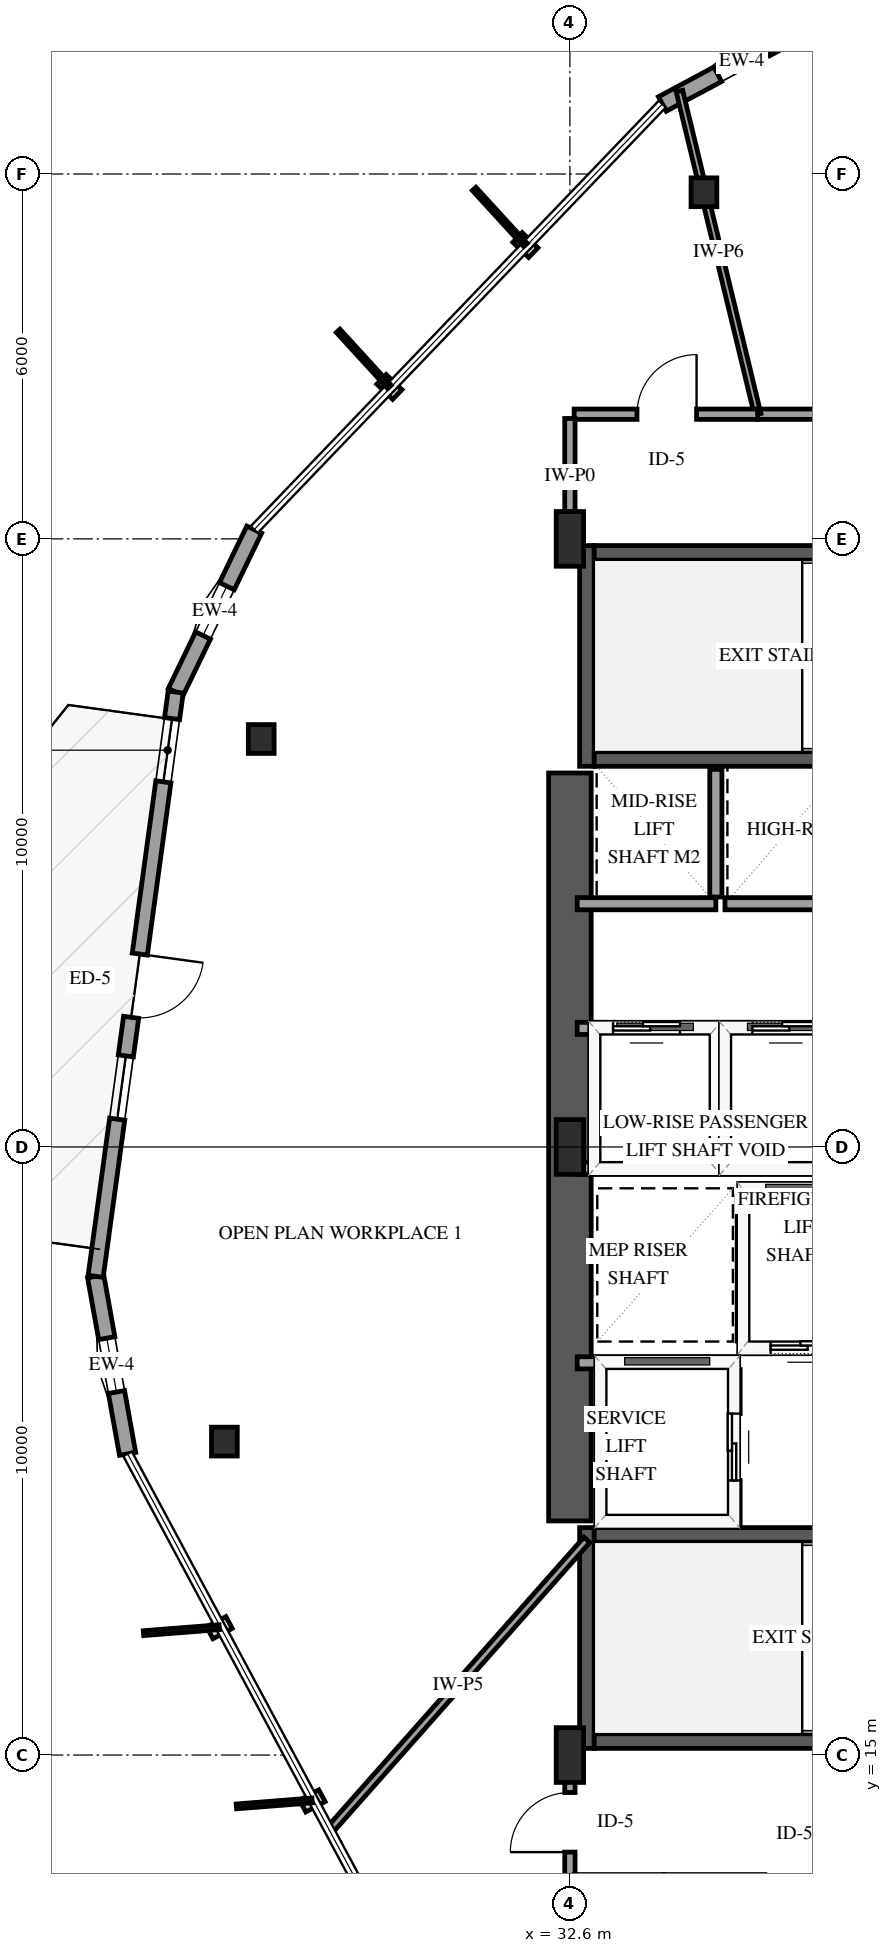
"""IFC4 building model, lengths in metres.
Left out: names, types, materials, properties, quantities, classifications, styles, units other than length and angle.
Written with IfcOpenShell. Run it as: python <this file> out.ifc"""

import sys

from ifc_helpers import new_model, si_unit, direction, frame, frame_2d, origin, origin_2d, place, context, subcontext, project, spatial, rectangle, i_section, extrude, element, fill, save


model = new_model("IFC4")
c1 = context("Model", 3, precision=1e-05, world=origin(), true_north=direction((0.0, 1.0)))
c2 = subcontext(c1, "Body", "Model", "MODEL_VIEW")
j1 = project(units=[si_unit("LENGTHUNIT", "METRE"), si_unit("PLANEANGLEUNIT", "RADIAN")], contexts=[c1])
p1 = place(None, origin())
s1 = spatial("IfcSite", under=j1, at=p1, CompositionType="ELEMENT")
p2 = place(p1, origin())
s2 = spatial("IfcBuilding", under=s1, at=p2, CompositionType="ELEMENT")
p3 = place(p2, frame((0.0, 0.0, 66.6)))
s3 = spatial("IfcBuildingStorey", under=s2, at=p3, CompositionType="ELEMENT", Elevation=66.6)
p4 = place(p3, frame((32.88, 15.11, 0.0), z_axis=(0.0, 0.0, 1.0), x_axis=(0.0, 1.0, 0.0)))
e1 = element("IfcWall", 1, at=p4, inside=s3, PredefinedType="SHEAR", context=c2, shape_type="SweptSolid", body=[
    extrude(rectangle(XDim=3.63, YDim=0.24, at=frame_2d((1.815, 0.0))), origin(), (0.0, 0.0, 1.0), 4.0),
])
for number, where, z_axis, x_axis in (
    (2, (33.0, 15.23, 0.0), (0.0, 0.0, 1.0), (1.0, 0.0, 0.0)),
    (3, (33.0, 18.62, 0.0), (0.0, 0.0, 1.0), (1.0, 0.0, 0.0)),
):
    element("IfcWall", number, at=place(p3, frame(where, z_axis=z_axis, x_axis=x_axis)), inside=s3, PredefinedType="SHEAR", context=c2, shape_type="SweptSolid", body=[
        extrude(rectangle(XDim=8.0, YDim=0.24, at=frame_2d((4.0, 0.0))), origin(), (0.0, 0.0, 1.0), 4.0),
    ])
p5 = place(p3, frame((32.88, 31.26, 0.0), z_axis=(0.0, 0.0, 1.0), x_axis=(0.0, 1.0, 0.0)))
e4 = element("IfcWall", 4, at=p5, inside=s3, PredefinedType="SHEAR", context=c2, shape_type="SweptSolid", body=[
    extrude(rectangle(XDim=3.63, YDim=0.24, at=frame_2d((1.815, 0.0))), origin(), (0.0, 0.0, 1.0), 4.0),
])
for number, where, z_axis, x_axis in (
    (5, (33.0, 31.38, 0.0), (0.0, 0.0, 1.0), (1.0, 0.0, 0.0)),
    (6, (33.0, 34.77, 0.0), (0.0, 0.0, 1.0), (1.0, 0.0, 0.0)),
):
    element("IfcWall", number, at=place(p3, frame(where, z_axis=z_axis, x_axis=x_axis)), inside=s3, PredefinedType="SHEAR", context=c2, shape_type="SweptSolid", body=[
        extrude(rectangle(XDim=8.0, YDim=0.24, at=frame_2d((4.0, 0.0))), origin(), (0.0, 0.0, 1.0), 4.0),
    ])
p6 = place(p3, frame((32.6, 18.85, 0.0), z_axis=(0.0, 0.0, 1.0), x_axis=(0.0, 1.0, 0.0)))
e7 = element("IfcWall", 7, at=p6, inside=s3, PredefinedType="SHEAR", context=c2, shape_type="SweptSolid", body=[
    extrude(rectangle(XDim=12.3, YDim=0.7, at=frame_2d((6.15, 0.0))), origin(), (0.0, 0.0, 1.0), 4.0),
])
for number, where, z_axis, x_axis in (
    (8, (32.6, 15.0, 0.0), (0.0, 0.0, 1.0), (1.0, 0.0, 0.0)),
    (9, (32.6, 25.0, 0.0), (0.0, 0.0, 1.0), (1.0, 0.0, 0.0)),
    (10, (32.6, 35.0, 0.0), (0.0, 0.0, 1.0), (1.0, 0.0, 0.0)),
):
    element("IfcColumn", number, at=place(p3, frame(where, z_axis=z_axis, x_axis=x_axis)), inside=s3, PredefinedType="PILASTER", context=c2, shape_type="SweptSolid", body=[
        extrude(rectangle(XDim=0.45, YDim=0.9, at=origin_2d()), origin(), (0.0, 0.0, 1.0), 4.0),
    ])
for number, where, z_axis, x_axis in (
    (11, (34.804, 40.7, 0.0), (0.0, 0.0, 1.0), (1.0, 0.0, 0.0)),
    (12, (27.523, 31.708, 0.0), (0.0, 0.0, 1.0), (1.0, 0.0, 0.0)),
    (13, (26.918, 20.155, 0.0), (0.0, 0.0, 1.0), (1.0, 0.0, 0.0)),
):
    element("IfcColumn", number, at=place(p3, frame(where, z_axis=z_axis, x_axis=x_axis)), inside=s3, PredefinedType="COLUMN", context=c2, shape_type="SweptSolid", body=[
        extrude(i_section(OverallWidth=0.424, OverallDepth=0.474, WebThickness=0.048, FlangeThickness=0.077, FilletRadius=0.038, at=origin_2d()), origin(), (0.0, 0.0, 1.0), 4.0),
    ])
p7 = place(p3, frame((36.735, 43.553, 0.0), z_axis=(0.0, 0.0, 1.0), x_axis=(-0.881307407795, -0.47254338739, 0.0)))
e14 = element("IfcWall", 14, at=p7, inside=s3, PredefinedType="SOLIDWALL", context=c2, shape_type="SweptSolid", body=[
    extrude(rectangle(XDim=2.967, YDim=0.27, at=frame_2d((1.483, 0.0))), origin(), (0.0, 0.0, 1.0), 3.079),
])
p8 = place(p7, frame((1.033, 0.0, 0.75)))
e15 = element("IfcOpeningElement", 15, at=p8, cuts=e14, PredefinedType="OPENING", context=c2, shape_type="SweptSolid", body=[
    extrude(rectangle(XDim=0.9, YDim=1.5, at=frame_2d((0.45, 0.75))), frame((0.0, 0.145, 0.0), z_axis=(0.0, -1.0, 0.0), x_axis=(1.0, 0.0, 0.0)), (0.0, 0.0, 1.0), 0.29),
])
p9 = place(p3, frame((27.408, 35.152, 0.0), z_axis=(0.0, 0.0, 1.0), x_axis=(-0.435190898054, -0.900338204371, 0.0)))
e16 = element("IfcWall", 16, at=p9, inside=s3, PredefinedType="SOLIDWALL", context=c2, shape_type="SweptSolid", body=[
    extrude(rectangle(XDim=2.967, YDim=0.27, at=frame_2d((1.483, 0.0))), origin(), (0.0, 0.0, 1.0), 3.079),
])
p10 = place(p9, frame((1.033, 0.0, 0.75)))
e17 = element("IfcOpeningElement", 17, at=p10, cuts=e16, PredefinedType="OPENING", context=c2, shape_type="SweptSolid", body=[
    extrude(rectangle(XDim=0.9, YDim=1.5, at=frame_2d((0.45, 0.75))), frame((0.0, 0.145, 0.0), z_axis=(0.0, -1.0, 0.0), x_axis=(1.0, 0.0, 0.0)), (0.0, 0.0, 1.0), 0.29),
])
p11 = place(p3, frame((24.801, 22.873, 0.0), z_axis=(0.0, 0.0, 1.0), x_axis=(0.177089231547, -0.984194799859, 0.0)))
e18 = element("IfcWall", 18, at=p11, inside=s3, PredefinedType="SOLIDWALL", context=c2, shape_type="SweptSolid", body=[
    extrude(rectangle(XDim=2.967, YDim=0.27, at=frame_2d((1.483, 0.0))), origin(), (0.0, 0.0, 1.0), 3.079),
])
p12 = place(p11, frame((1.033, 0.0, 0.75)))
e19 = element("IfcOpeningElement", 19, at=p12, cuts=e18, PredefinedType="OPENING", context=c2, shape_type="SweptSolid", body=[
    extrude(rectangle(XDim=0.9, YDim=1.5, at=frame_2d((0.45, 0.75))), frame((0.0, 0.145, 0.0), z_axis=(0.0, -1.0, 0.0), x_axis=(1.0, 0.0, 0.0)), (0.0, 0.0, 1.0), 0.29),
])
p13 = place(p3, frame((26.117, 32.481, 0.0), z_axis=(0.0, 0.0, 1.0), x_axis=(-0.13571645175, -0.99074772002, 0.0)))
e20 = element("IfcWall", 20, at=p13, inside=s3, PredefinedType="SOLIDWALL", context=c2, shape_type="SweptSolid", body=[
    extrude(rectangle(XDim=9.698, YDim=0.25, at=frame_2d((4.849, 0.0))), origin(), (0.0, 0.0, 1.0), 3.079),
])
p14 = place(p13, frame((4.349, 0.0, 0.0)))
e21 = element("IfcOpeningElement", 21, at=p14, cuts=e20, PredefinedType="OPENING", context=c2, shape_type="SweptSolid", body=[
    extrude(rectangle(XDim=1.05, YDim=2.15, at=frame_2d((0.525, 1.075))), frame((0.0, 0.135, 0.0), z_axis=(0.0, -1.0, 0.0), x_axis=(1.0, 0.0, 0.0)), (0.0, 0.0, 1.0), 0.27),
])
p15 = place(p13, frame((0.44, 0.0, 0.72)))
e22 = element("IfcOpeningElement", 22, at=p15, cuts=e20, PredefinedType="OPENING", context=c2, shape_type="SweptSolid", body=[
    extrude(rectangle(XDim=1.05, YDim=1.55, at=frame_2d((0.525, 0.775))), frame((0.0, 0.135, 0.0), z_axis=(0.0, -1.0, 0.0), x_axis=(1.0, 0.0, 0.0)), (0.0, 0.0, 1.0), 0.27),
])
p16 = place(p13, frame((6.039, 0.0, 0.72)))
e23 = element("IfcOpeningElement", 23, at=p16, cuts=e20, PredefinedType="OPENING", context=c2, shape_type="SweptSolid", body=[
    extrude(rectangle(XDim=1.05, YDim=1.55, at=frame_2d((0.525, 0.775))), frame((0.0, 0.135, 0.0), z_axis=(0.0, -1.0, 0.0), x_axis=(1.0, 0.0, 0.0)), (0.0, 0.0, 1.0), 0.27),
])
p17 = place(p3, frame((35.45, 21.7, 0.0), z_axis=(0.0, 0.0, 1.0), x_axis=(1.0, 0.0, 0.0)))
e24 = element("IfcWall", 24, at=p17, inside=s3, PredefinedType="SOLIDWALL", context=c2, shape_type="SweptSolid", body=[
    extrude(rectangle(XDim=2.0, YDim=0.2, at=frame_2d((1.0, 0.0))), origin(), (0.0, 0.0, 1.0), 3.7),
])
p18 = place(p17, frame((0.45, 0.0, 0.0)))
e25 = element("IfcOpeningElement", 25, at=p18, cuts=e24, PredefinedType="OPENING", context=c2, shape_type="SweptSolid", body=[
    extrude(rectangle(XDim=1.1, YDim=2.15, at=frame_2d((0.55, 1.075))), frame((0.0, 0.11, 0.0), z_axis=(0.0, -1.0, 0.0), x_axis=(1.0, 0.0, 0.0)), (0.0, 0.0, 1.0), 0.22),
])
p19 = place(p3, frame((35.45, 24.3, 0.0), z_axis=(0.0, 0.0, 1.0), x_axis=(1.0, 0.0, 0.0)))
e26 = element("IfcWall", 26, at=p19, inside=s3, PredefinedType="SOLIDWALL", context=c2, shape_type="SweptSolid", body=[
    extrude(rectangle(XDim=2.0, YDim=0.2, at=frame_2d((1.0, 0.0))), origin(), (0.0, 0.0, 1.0), 3.7),
])
p20 = place(p3, frame((35.45, 21.81, 0.0), z_axis=(0.0, 0.0, 1.0), x_axis=(0.0, 1.0, 0.0)))
e27 = element("IfcWall", 27, at=p20, inside=s3, PredefinedType="SOLIDWALL", context=c2, shape_type="SweptSolid", body=[
    extrude(rectangle(XDim=2.38, YDim=0.2, at=frame_2d((1.19, 0.0))), origin(), (0.0, 0.0, 1.0), 3.7),
])
p21 = place(p3, frame((32.72, 21.45, 0.0), z_axis=(0.0, 0.0, 1.0), x_axis=(1.0, 0.0, 0.0)))
e28 = element("IfcWall", 28, at=p21, inside=s3, PredefinedType="SOLIDWALL", context=c2, shape_type="SweptSolid", body=[
    extrude(rectangle(XDim=2.58, YDim=0.2, at=frame_2d((1.29, 0.0))), origin(), (0.0, 0.0, 1.0), 3.7),
])
p22 = place(p3, frame((35.3, 18.79, 0.0), z_axis=(0.0, 0.0, 1.0), x_axis=(0.0, 1.0, 0.0)))
e29 = element("IfcWall", 29, at=p22, inside=s3, PredefinedType="SOLIDWALL", context=c2, shape_type="SweptSolid", body=[
    extrude(rectangle(XDim=2.55, YDim=0.2, at=frame_2d((1.275, 0.0))), origin(), (0.0, 0.0, 1.0), 3.7),
])
p23 = place(p22, frame((0.725, 0.0, 0.0)))
e30 = element("IfcOpeningElement", 30, at=p23, cuts=e29, PredefinedType="OPENING", context=c2, shape_type="SweptSolid", body=[
    extrude(rectangle(XDim=1.1, YDim=2.15, at=frame_2d((0.55, 1.075))), frame((0.0, 0.11, 0.0), z_axis=(0.0, -1.0, 0.0), x_axis=(1.0, 0.0, 0.0)), (0.0, 0.0, 1.0), 0.22),
])
p24 = place(p3, frame((32.72, 24.65, 0.0), z_axis=(0.0, 0.0, 1.0), x_axis=(1.0, 0.0, 0.0)))
e31 = element("IfcWall", 31, at=p24, inside=s3, PredefinedType="SOLIDWALL", context=c2, shape_type="SweptSolid", body=[
    extrude(rectangle(XDim=2.28, YDim=0.2, at=frame_2d((1.14, 0.0))), origin(), (0.0, 0.0, 1.0), 3.7),
])
p25 = place(p3, frame((32.72, 26.95, 0.0), z_axis=(0.0, 0.0, 1.0), x_axis=(1.0, 0.0, 0.0)))
e32 = element("IfcWall", 32, at=p25, inside=s3, PredefinedType="SOLIDWALL", context=c2, shape_type="SweptSolid", body=[
    extrude(rectangle(XDim=2.28, YDim=0.2, at=frame_2d((1.14, 0.0))), origin(), (0.0, 0.0, 1.0), 3.7),
])
p26 = place(p25, frame((0.59, 0.0, 0.0)))
e33 = element("IfcOpeningElement", 33, at=p26, cuts=e32, PredefinedType="OPENING", context=c2, shape_type="SweptSolid", body=[
    extrude(rectangle(XDim=1.1, YDim=2.15, at=frame_2d((0.55, 1.075))), frame((0.0, 0.11, 0.0), z_axis=(0.0, -1.0, 0.0), x_axis=(1.0, 0.0, 0.0)), (0.0, 0.0, 1.0), 0.22),
])
p27 = place(p3, frame((35.0, 24.76, 0.0), z_axis=(0.0, 0.0, 1.0), x_axis=(0.0, 1.0, 0.0)))
e34 = element("IfcWall", 34, at=p27, inside=s3, PredefinedType="SOLIDWALL", context=c2, shape_type="SweptSolid", body=[
    extrude(rectangle(XDim=2.08, YDim=0.2, at=frame_2d((1.04, 0.0))), origin(), (0.0, 0.0, 1.0), 3.7),
])
p28 = place(p3, frame((35.15, 24.65, 0.0), z_axis=(0.0, 0.0, 1.0), x_axis=(1.0, 0.0, 0.0)))
e35 = element("IfcWall", 35, at=p28, inside=s3, PredefinedType="SOLIDWALL", context=c2, shape_type="SweptSolid", body=[
    extrude(rectangle(XDim=2.0, YDim=0.2, at=frame_2d((1.0, 0.0))), origin(), (0.0, 0.0, 1.0), 3.7),
])
p29 = place(p3, frame((35.15, 26.95, 0.0), z_axis=(0.0, 0.0, 1.0), x_axis=(1.0, 0.0, 0.0)))
e36 = element("IfcWall", 36, at=p29, inside=s3, PredefinedType="SOLIDWALL", context=c2, shape_type="SweptSolid", body=[
    extrude(rectangle(XDim=2.0, YDim=0.2, at=frame_2d((1.0, 0.0))), origin(), (0.0, 0.0, 1.0), 3.7),
])
p30 = place(p29, frame((0.45, 0.0, 0.0)))
e37 = element("IfcOpeningElement", 37, at=p30, cuts=e36, PredefinedType="OPENING", context=c2, shape_type="SweptSolid", body=[
    extrude(rectangle(XDim=1.1, YDim=2.15, at=frame_2d((0.55, 1.075))), frame((0.0, 0.11, 0.0), z_axis=(0.0, -1.0, 0.0), x_axis=(1.0, 0.0, 0.0)), (0.0, 0.0, 1.0), 0.22),
])
p31 = place(p3, frame((32.72, 29.0, 0.0), z_axis=(0.0, 0.0, 1.0), x_axis=(1.0, 0.0, 0.0)))
e38 = element("IfcWall", 38, at=p31, inside=s3, PredefinedType="SOLIDWALL", context=c2, shape_type="SweptSolid", body=[
    extrude(rectangle(XDim=2.28, YDim=0.2, at=frame_2d((1.14, 0.0))), origin(), (0.0, 0.0, 1.0), 3.7),
])
p32 = place(p3, frame((35.0, 29.11, 0.0), z_axis=(0.0, 0.0, 1.0), x_axis=(0.0, 1.0, 0.0)))
e39 = element("IfcWall", 39, at=p32, inside=s3, PredefinedType="SOLIDWALL", context=c2, shape_type="SweptSolid", body=[
    extrude(rectangle(XDim=2.1, YDim=0.2, at=frame_2d((1.05, 0.0))), origin(), (0.0, 0.0, 1.0), 3.7),
])
p33 = place(p3, frame((35.15, 29.0, 0.0), z_axis=(0.0, 0.0, 1.0), x_axis=(1.0, 0.0, 0.0)))
e40 = element("IfcWall", 40, at=p33, inside=s3, PredefinedType="SOLIDWALL", context=c2, shape_type="SweptSolid", body=[
    extrude(rectangle(XDim=2.0, YDim=0.2, at=frame_2d((1.0, 0.0))), origin(), (0.0, 0.0, 1.0), 3.7),
])
p34 = place(p3, frame((35.687, 37.05, 0.0), z_axis=(0.0, 0.0, 1.0), x_axis=(1.0, 0.0, 0.0)))
e41 = element("IfcWall", 41, at=p34, inside=s3, PredefinedType="PARTITIONING", context=c2, shape_type="SweptSolid", body=[
    extrude(rectangle(XDim=7.67, YDim=0.17, at=frame_2d((3.835, 0.0))), origin(), (0.0, 0.0, 1.0), 3.7),
])
p35 = place(p34, frame((3.36, 0.0, 0.0)))
e42 = element("IfcOpeningElement", 42, at=p35, cuts=e41, PredefinedType="OPENING", context=c2, shape_type="SweptSolid", body=[
    extrude(rectangle(XDim=0.98, YDim=2.15, at=frame_2d((0.49, 1.075))), frame((0.0, 0.095, 0.0), z_axis=(0.0, -1.0, 0.0), x_axis=(1.0, 0.0, 0.0)), (0.0, 0.0, 1.0), 0.19),
])
p36 = place(p3, frame((32.88, 18.54, 0.0), z_axis=(0.0, 0.0, 1.0), x_axis=(-0.66312401375, -0.748509547293, 0.0)))
e43 = element("IfcWall", 43, at=p36, inside=s3, PredefinedType="PARTITIONING", context=c2, shape_type="SweptSolid", body=[
    extrude(rectangle(XDim=6.385, YDim=0.13, at=frame_2d((3.192, 0.0))), origin(), (0.0, 0.0, 1.0), 3.7),
])
p37 = place(p3, frame((35.687, 37.05, 0.0), z_axis=(0.0, 0.0, 1.0), x_axis=(-0.235196214619, 0.97194791045, 0.0)))
e44 = element("IfcWall", 44, at=p37, inside=s3, PredefinedType="PARTITIONING", context=c2, shape_type="SweptSolid", body=[
    extrude(rectangle(XDim=5.468, YDim=0.11, at=frame_2d((2.734, 0.0))), origin(), (0.0, 0.0, 1.0), 2.995),
])
p38 = place(p3, frame((32.67, 37.05, 0.0), z_axis=(0.0, 0.0, 1.0), x_axis=(1.0, 0.0, 0.0)))
e45 = element("IfcWall", 45, at=p38, inside=s3, PredefinedType="PARTITIONING", context=c2, shape_type="SweptSolid", body=[
    extrude(rectangle(XDim=3.017, YDim=0.17, at=frame_2d((1.509, 0.0))), origin(), (0.0, 0.0, 1.0), 3.7),
])
p39 = place(p38, frame((1.033, 0.0, 0.0)))
e46 = element("IfcOpeningElement", 46, at=p39, cuts=e45, PredefinedType="OPENING", context=c2, shape_type="SweptSolid", body=[
    extrude(rectangle(XDim=0.98, YDim=2.15, at=frame_2d((0.49, 1.075))), frame((0.0, 0.095, 0.0), z_axis=(0.0, -1.0, 0.0), x_axis=(1.0, 0.0, 0.0)), (0.0, 0.0, 1.0), 0.19),
])
p40 = place(p3, frame((32.6, 13.02, 0.0), z_axis=(0.0, 0.0, 1.0), x_axis=(0.0, 1.0, 0.0)))
e47 = element("IfcWall", 47, at=p40, inside=s3, PredefinedType="PARTITIONING", context=c2, shape_type="SweptSolid", body=[
    extrude(rectangle(XDim=1.91, YDim=0.17, at=frame_2d((0.955, 0.0))), origin(), (0.0, 0.0, 1.0), 3.7),
])
p41 = place(p40, frame((0.384, 0.0, 0.0)))
e48 = element("IfcOpeningElement", 48, at=p41, cuts=e47, PredefinedType="OPENING", context=c2, shape_type="SweptSolid", body=[
    extrude(rectangle(XDim=0.98, YDim=2.15, at=frame_2d((0.49, 1.075))), frame((0.0, 0.095, 0.0), z_axis=(0.0, -1.0, 0.0), x_axis=(1.0, 0.0, 0.0)), (0.0, 0.0, 1.0), 0.19),
])
p42 = place(p3, frame((32.6, 35.07, 0.0), z_axis=(0.0, 0.0, 1.0), x_axis=(0.0, 1.0, 0.0)))
e49 = element("IfcWall", 49, at=p42, inside=s3, PredefinedType="PARTITIONING", context=c2, shape_type="SweptSolid", body=[
    extrude(rectangle(XDim=1.91, YDim=0.17, at=frame_2d((0.955, 0.0))), origin(), (0.0, 0.0, 1.0), 3.7),
])
p43 = place(p8, origin())
e50 = element("IfcWindow", 50, at=p43, inside=s3, PartitioningType="SINGLE_PANEL", PredefinedType="WINDOW", context=c2, shape_type="SweptSolid", body=[
    extrude(rectangle(XDim=0.9, YDim=1.5, at=frame_2d((0.45, 0.75))), frame((0.0, 0.03, 0.0), z_axis=(0.0, -1.0, 0.0), x_axis=(1.0, 0.0, 0.0)), (0.0, 0.0, 1.0), 0.06),
])
fill(e15, e50)
p44 = place(p10, origin())
e51 = element("IfcWindow", 51, at=p44, inside=s3, PartitioningType="SINGLE_PANEL", PredefinedType="WINDOW", context=c2, shape_type="SweptSolid", body=[
    extrude(rectangle(XDim=0.9, YDim=1.5, at=frame_2d((0.45, 0.75))), frame((0.0, 0.03, 0.0), z_axis=(0.0, -1.0, 0.0), x_axis=(1.0, 0.0, 0.0)), (0.0, 0.0, 1.0), 0.06),
])
fill(e17, e51)
p45 = place(p12, origin())
e52 = element("IfcWindow", 52, at=p45, inside=s3, PartitioningType="SINGLE_PANEL", PredefinedType="WINDOW", context=c2, shape_type="SweptSolid", body=[
    extrude(rectangle(XDim=0.9, YDim=1.5, at=frame_2d((0.45, 0.75))), frame((0.0, 0.03, 0.0), z_axis=(0.0, -1.0, 0.0), x_axis=(1.0, 0.0, 0.0)), (0.0, 0.0, 1.0), 0.06),
])
fill(e19, e52)
p46 = place(p14, origin())
e53 = element("IfcDoor", 53, at=p46, inside=s3, OperationType="SINGLE_SWING_LEFT", PredefinedType="DOOR", context=c2, shape_type="SweptSolid", body=[
    extrude(rectangle(XDim=1.05, YDim=2.15, at=frame_2d((0.525, 1.075))), frame((0.0, 0.025, 0.0), z_axis=(0.0, -1.0, 0.0), x_axis=(1.0, 0.0, 0.0)), (0.0, 0.0, 1.0), 0.05),
])
fill(e21, e53)
p47 = place(p15, origin())
e54 = element("IfcWindow", 54, at=p47, inside=s3, PartitioningType="SINGLE_PANEL", PredefinedType="WINDOW", context=c2, shape_type="SweptSolid", body=[
    extrude(rectangle(XDim=1.05, YDim=1.55, at=frame_2d((0.525, 0.775))), frame((0.0, 0.03, 0.0), z_axis=(0.0, -1.0, 0.0), x_axis=(1.0, 0.0, 0.0)), (0.0, 0.0, 1.0), 0.06),
])
fill(e22, e54)
p48 = place(p16, origin())
e55 = element("IfcWindow", 55, at=p48, inside=s3, PartitioningType="SINGLE_PANEL", PredefinedType="WINDOW", context=c2, shape_type="SweptSolid", body=[
    extrude(rectangle(XDim=1.05, YDim=1.55, at=frame_2d((0.525, 0.775))), frame((0.0, 0.03, 0.0), z_axis=(0.0, -1.0, 0.0), x_axis=(1.0, 0.0, 0.0)), (0.0, 0.0, 1.0), 0.06),
])
fill(e23, e55)
p49 = place(p18, origin())
e56 = element("IfcDoor", 56, at=p49, inside=s3, OperationType="SLIDING_TO_LEFT", PredefinedType="DOOR", context=c2, shape_type="SweptSolid", body=[
    extrude(rectangle(XDim=1.1, YDim=2.15, at=frame_2d((0.55, 1.075))), frame((0.0, 0.025, 0.0), z_axis=(0.0, -1.0, 0.0), x_axis=(1.0, 0.0, 0.0)), (0.0, 0.0, 1.0), 0.05),
])
fill(e25, e56)
p50 = place(p23, origin())
e57 = element("IfcDoor", 57, at=p50, inside=s3, OperationType="SLIDING_TO_LEFT", PredefinedType="DOOR", context=c2, shape_type="SweptSolid", body=[
    extrude(rectangle(XDim=1.1, YDim=2.15, at=frame_2d((0.55, 1.075))), frame((0.0, 0.025, 0.0), z_axis=(0.0, -1.0, 0.0), x_axis=(1.0, 0.0, 0.0)), (0.0, 0.0, 1.0), 0.05),
])
fill(e30, e57)
p51 = place(p26, origin())
e58 = element("IfcDoor", 58, at=p51, inside=s3, OperationType="SLIDING_TO_LEFT", PredefinedType="DOOR", context=c2, shape_type="SweptSolid", body=[
    extrude(rectangle(XDim=1.1, YDim=2.15, at=frame_2d((0.55, 1.075))), frame((0.0, 0.025, 0.0), z_axis=(0.0, -1.0, 0.0), x_axis=(1.0, 0.0, 0.0)), (0.0, 0.0, 1.0), 0.05),
])
fill(e33, e58)
p52 = place(p30, origin())
e59 = element("IfcDoor", 59, at=p52, inside=s3, OperationType="SLIDING_TO_LEFT", PredefinedType="DOOR", context=c2, shape_type="SweptSolid", body=[
    extrude(rectangle(XDim=1.1, YDim=2.15, at=frame_2d((0.55, 1.075))), frame((0.0, 0.025, 0.0), z_axis=(0.0, -1.0, 0.0), x_axis=(1.0, 0.0, 0.0)), (0.0, 0.0, 1.0), 0.05),
])
fill(e37, e59)
p53 = place(p39, origin())
e60 = element("IfcDoor", 60, at=p53, inside=s3, OperationType="SINGLE_SWING_RIGHT", PredefinedType="DOOR", context=c2, shape_type="SweptSolid", body=[
    extrude(rectangle(XDim=0.98, YDim=2.15, at=frame_2d((0.49, 1.075))), frame((0.0, 0.025, 0.0), z_axis=(0.0, -1.0, 0.0), x_axis=(1.0, 0.0, 0.0)), (0.0, 0.0, 1.0), 0.05),
])
fill(e46, e60)
p54 = place(p41, origin())
e61 = element("IfcDoor", 61, at=p54, inside=s3, OperationType="SINGLE_SWING_LEFT", PredefinedType="DOOR", context=c2, shape_type="SweptSolid", body=[
    extrude(rectangle(XDim=0.98, YDim=2.15, at=frame_2d((0.49, 1.075))), frame((0.0, 0.025, 0.0), z_axis=(0.0, -1.0, 0.0), x_axis=(1.0, 0.0, 0.0)), (0.0, 0.0, 1.0), 0.05),
])
fill(e48, e61)
save(model, sys.argv[1])
